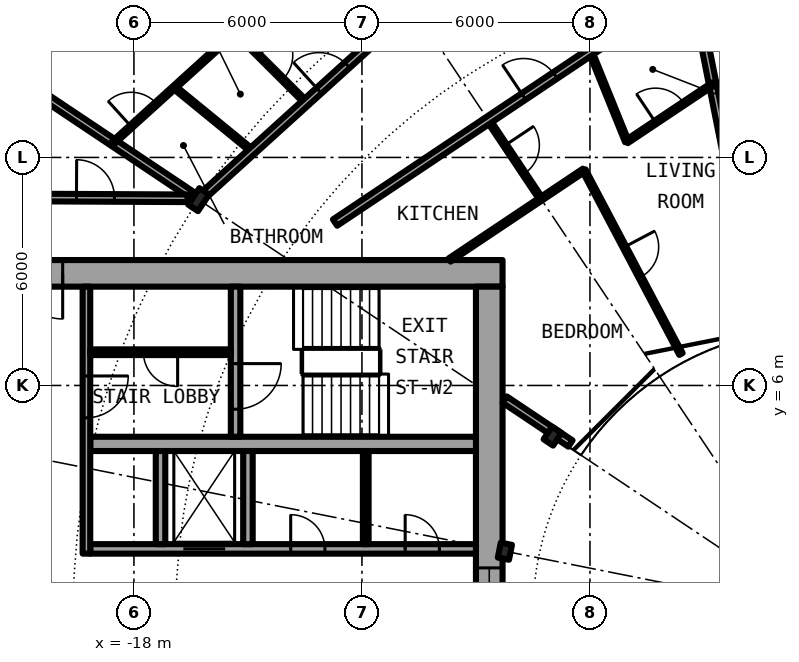
"""IFC4 building model, lengths in metres.
Left out: names, types, materials, properties, quantities, classifications, styles, units other than length and angle.
Written with IfcOpenShell. Run it as: python <this file> out.ifc"""

import sys

from ifc_helpers import new_model, si_unit, direction, frame, frame_2d, origin, origin_2d, place, context, subcontext, project, spatial, rectangle, i_section, extrude, element, fill, save


model = new_model("IFC4")
c1 = context("Model", 3, precision=1e-05, world=origin(), true_north=direction((0.0, 1.0)))
c2 = subcontext(c1, "Body", "Model", "MODEL_VIEW")
j1 = project(units=[si_unit("LENGTHUNIT", "METRE"), si_unit("PLANEANGLEUNIT", "RADIAN")], contexts=[c1])
p1 = place(None, origin())
s1 = spatial("IfcSite", under=j1, at=p1, CompositionType="ELEMENT")
p2 = place(p1, origin())
s2 = spatial("IfcBuilding", under=s1, at=p2, CompositionType="ELEMENT")
p3 = place(p2, frame((0.0, 0.0, 63.6)))
s3 = spatial("IfcBuildingStorey", under=s2, at=p3, CompositionType="ELEMENT", Elevation=63.6)
p4 = place(p3, frame((-16.297, 10.889, 0.0), z_axis=(0.0, 0.0, 1.0), x_axis=(-0.831469612303, 0.55557023302, 0.0)))
e1 = element("IfcColumn", 1, at=p4, inside=s3, PredefinedType="COLUMN", context=c2, shape_type="SweptSolid", body=[
    extrude(i_section(OverallWidth=0.306, OverallDepth=0.524, WebThickness=0.021, FlangeThickness=0.04, FilletRadius=0.027, at=origin_2d()), origin(), (0.0, 0.0, 1.0), 3.05),
])
for number, where, z_axis, x_axis in (
    (2, (-6.984, 4.667, 0.0), (0.0, 0.0, 1.0), (-0.831, 0.556, 0.0)),
    (3, (-8.239, 1.639, 0.0), (0.0, 0.0, 1.0), (-0.981, 0.195, 0.0)),
):
    element("IfcColumn", number, at=place(p3, frame(where, z_axis=z_axis, x_axis=x_axis)), inside=s3, PredefinedType="COLUMN", context=c2, shape_type="SweptSolid", body=[
        extrude(i_section(OverallWidth=0.3, OverallDepth=0.4, WebThickness=0.013, FlangeThickness=0.024, FilletRadius=0.027, at=origin_2d()), origin(), (0.0, 0.0, 1.0), 3.05),
    ])
p5 = place(p3, frame((-8.3, 8.95, 0.0), z_axis=(0.0, 0.0, 1.0), x_axis=(-1.0, 0.0, 0.0)))
e4 = element("IfcWall", 4, at=p5, inside=s3, PredefinedType="SHEAR", context=c2, shape_type="SweptSolid", body=[
    extrude(rectangle(XDim=14.0, YDim=0.7, at=frame_2d((7.0, 0.0))), origin(), (0.0, 0.0, 1.0), 3.05),
])
p6 = place(p5, frame((11.575, 0.0, 0.0)))
e5 = element("IfcOpeningElement", 5, at=p6, cuts=e4, PredefinedType="OPENING", context=c2, shape_type="SweptSolid", body=[
    extrude(rectangle(XDim=1.2, YDim=2.3, at=frame_2d((0.6, 1.15))), frame((0.0, 0.36, 0.0), z_axis=(0.0, -1.0, 0.0), x_axis=(1.0, 0.0, 0.0)), (0.0, 0.0, 1.0), 0.72),
])
p7 = place(p3, frame((-8.65, 8.6, 0.0), z_axis=(0.0, 0.0, 1.0), x_axis=(0.0, -1.0, 0.0)))
e6 = element("IfcWall", 6, at=p7, inside=s3, PredefinedType="SHEAR", context=c2, shape_type="SweptSolid", body=[
    extrude(rectangle(XDim=17.2, YDim=0.7, at=frame_2d((8.6, 0.0))), origin(), (0.0, 0.0, 1.0), 3.05),
])
p8 = place(p7, frame((7.4, 0.0, 0.1)))
e7 = element("IfcOpeningElement", 7, at=p8, cuts=e6, PredefinedType="OPENING", context=c2, shape_type="SweptSolid", body=[
    extrude(rectangle(XDim=2.4, YDim=2.2, at=frame_2d((1.2, 1.1))), frame((0.0, 0.36, 0.0), z_axis=(0.0, -1.0, 0.0), x_axis=(1.0, 0.0, 0.0)), (0.0, 0.0, 1.0), 0.72),
])
p9 = place(p3, frame((-19.15, 1.7, 0.0), z_axis=(0.0, 0.0, 1.0), x_axis=(1.0, 0.0, 0.0)))
e8 = element("IfcWall", 8, at=p9, inside=s3, PredefinedType="SHEAR", context=c2, shape_type="SweptSolid", body=[
    extrude(rectangle(XDim=10.15, YDim=0.25, at=frame_2d((5.075, 0.0))), origin(), (0.0, 0.0, 1.0), 3.05),
])
p10 = place(p9, frame((2.45, 0.0, 0.0)))
e9 = element("IfcOpeningElement", 9, at=p10, cuts=e8, PredefinedType="OPENING", context=c2, shape_type="SweptSolid", body=[
    extrude(rectangle(XDim=1.1, YDim=2.3, at=frame_2d((0.55, 1.15))), frame((0.0, 0.135, 0.0), z_axis=(0.0, -1.0, 0.0), x_axis=(1.0, 0.0, 0.0)), (0.0, 0.0, 1.0), 0.27),
])
p11 = place(p9, frame((8.288, 0.0, 0.0)))
e10 = element("IfcOpeningElement", 10, at=p11, cuts=e8, PredefinedType="OPENING", context=c2, shape_type="SweptSolid", body=[
    extrude(rectangle(XDim=0.9, YDim=2.3, at=frame_2d((0.45, 1.15))), frame((0.0, 0.135, 0.0), z_axis=(0.0, -1.0, 0.0), x_axis=(1.0, 0.0, 0.0)), (0.0, 0.0, 1.0), 0.27),
])
p12 = place(p9, frame((5.275, 0.0, 0.0)))
e11 = element("IfcOpeningElement", 11, at=p12, cuts=e8, PredefinedType="OPENING", context=c2, shape_type="SweptSolid", body=[
    extrude(rectangle(XDim=0.9, YDim=2.3, at=frame_2d((0.45, 1.15))), frame((0.0, 0.135, 0.0), z_axis=(0.0, -1.0, 0.0), x_axis=(1.0, 0.0, 0.0)), (0.0, 0.0, 1.0), 0.27),
])
p13 = place(p3, frame((-9.0, 4.462, 0.0), z_axis=(0.0, 0.0, 1.0), x_axis=(-1.0, 0.0, 0.0)))
e12 = element("IfcWall", 12, at=p13, inside=s3, PredefinedType="SHEAR", context=c2, shape_type="SweptSolid", body=[
    extrude(rectangle(XDim=10.15, YDim=0.375, at=frame_2d((5.075, 0.0))), origin(), (0.0, 0.0, 1.0), 3.05),
])
p14 = place(p3, frame((-15.325, 8.6, 0.0), z_axis=(0.0, 0.0, 1.0), x_axis=(0.0, -1.0, 0.0)))
e13 = element("IfcWall", 13, at=p14, inside=s3, PredefinedType="SHEAR", context=c2, shape_type="SweptSolid", body=[
    extrude(rectangle(XDim=3.95, YDim=0.25, at=frame_2d((1.975, 0.0))), origin(), (0.0, 0.0, 1.0), 3.05),
])
p15 = place(p14, frame((2.025, 0.0, 0.0)))
e14 = element("IfcOpeningElement", 14, at=p15, cuts=e13, PredefinedType="OPENING", context=c2, shape_type="SweptSolid", body=[
    extrude(rectangle(XDim=1.2, YDim=2.3, at=frame_2d((0.6, 1.15))), frame((0.0, 0.135, 0.0), z_axis=(0.0, -1.0, 0.0), x_axis=(1.0, 0.0, 0.0)), (0.0, 0.0, 1.0), 0.27),
])
for number, where, z_axis, x_axis in (
    (15, (-15.0, 1.825, 0.0), (0.0, 0.0, 1.0), (0.0, 1.0, 0.0)),
    (16, (-17.3, 1.825, 0.0), (0.0, 0.0, 1.0), (0.0, 1.0, 0.0)),
):
    element("IfcWall", number, at=place(p3, frame(where, z_axis=z_axis, x_axis=x_axis)), inside=s3, PredefinedType="SOLIDWALL", context=c2, shape_type="SweptSolid", body=[
        extrude(rectangle(XDim=2.45, YDim=0.25, at=frame_2d((1.225, 0.0))), origin(), (0.0, 0.0, 1.0), 2.7),
    ])
p16 = place(p3, frame((-19.25, 8.6, 0.0), z_axis=(0.0, 0.0, 1.0), x_axis=(0.0, -1.0, 0.0)))
e17 = element("IfcWall", 17, at=p16, inside=s3, PredefinedType="SOLIDWALL", context=c2, shape_type="SweptSolid", body=[
    extrude(rectangle(XDim=7.025, YDim=0.2, at=frame_2d((3.513, 0.0))), origin(), (0.0, 0.0, 1.0), 2.7),
])
p17 = place(p16, frame((2.35, 0.0, 0.0)))
e18 = element("IfcOpeningElement", 18, at=p17, cuts=e17, PredefinedType="OPENING", context=c2, shape_type="SweptSolid", body=[
    extrude(rectangle(XDim=1.1, YDim=2.3, at=frame_2d((0.55, 1.15))), frame((0.0, 0.11, 0.0), z_axis=(0.0, -1.0, 0.0), x_axis=(1.0, 0.0, 0.0)), (0.0, 0.0, 1.0), 0.22),
])
p18 = place(p3, frame((-11.9, 1.825, 0.0), z_axis=(0.0, 0.0, 1.0), x_axis=(0.0, 1.0, 0.0)))
e19 = element("IfcWall", 19, at=p18, inside=s3, PredefinedType="PARTITIONING", context=c2, shape_type="SweptSolid", body=[
    extrude(rectangle(XDim=2.45, YDim=0.15, at=frame_2d((1.225, 0.0))), origin(), (0.0, 0.0, 1.0), 2.7),
])
p19 = place(p3, frame((-15.45, 6.875, 0.0), z_axis=(0.0, 0.0, 1.0), x_axis=(-1.0, 0.0, 0.0)))
e20 = element("IfcWall", 20, at=p19, inside=s3, PredefinedType="PARTITIONING", context=c2, shape_type="SweptSolid", body=[
    extrude(rectangle(XDim=3.7, YDim=0.15, at=frame_2d((1.85, 0.0))), origin(), (0.0, 0.0, 1.0), 2.7),
])
p20 = place(p19, frame((1.4, 0.0, 0.0)))
e21 = element("IfcOpeningElement", 21, at=p20, cuts=e20, PredefinedType="OPENING", context=c2, shape_type="SweptSolid", body=[
    extrude(rectangle(XDim=0.9, YDim=2.3, at=frame_2d((0.45, 1.15))), frame((0.0, 0.085, 0.0), z_axis=(0.0, -1.0, 0.0), x_axis=(1.0, 0.0, 0.0)), (0.0, 0.0, 1.0), 0.17),
])
p21 = place(p3, frame((-22.595, 15.098, 0.0), z_axis=(0.0, 0.0, 1.0), x_axis=(0.831382022135, -0.555701298605, 0.0)))
e22 = element("IfcWall", 22, at=p21, inside=s3, PredefinedType="PARTITIONING", context=c2, shape_type="SweptSolid", body=[
    extrude(rectangle(XDim=7.313, YDim=0.2, at=frame_2d((3.657, 0.0))), origin(), (0.0, 0.0, 1.0), 2.7),
])
p22 = place(p3, frame((-17.219, 21.023, 0.0), z_axis=(0.0, 0.0, 1.0), x_axis=(0.633664062855, -0.773608334654, 0.0)))
e23 = element("IfcWall", 23, at=p22, inside=s3, PredefinedType="PARTITIONING", context=c2, shape_type="SweptSolid", body=[
    extrude(rectangle(XDim=8.138, YDim=0.1, at=frame_2d((4.069, 0.0))), origin(), (0.0, 0.0, 1.0), 2.7),
])
p23 = place(p22, frame((6.377, 0.0, 0.0)))
e24 = element("IfcOpeningElement", 24, at=p23, cuts=e23, PredefinedType="OPENING", context=c2, shape_type="SweptSolid", body=[
    extrude(rectangle(XDim=0.9, YDim=2.3, at=frame_2d((0.45, 1.15))), frame((0.0, 0.06, 0.0), z_axis=(0.0, -1.0, 0.0), x_axis=(1.0, 0.0, 0.0)), (0.0, 0.0, 1.0), 0.12),
])
p24 = place(p22, frame((2.308, 0.0, 0.0)))
e25 = element("IfcOpeningElement", 25, at=p24, cuts=e23, PredefinedType="OPENING", context=c2, shape_type="SweptSolid", body=[
    extrude(rectangle(XDim=0.9, YDim=2.3, at=frame_2d((0.45, 1.15))), frame((0.0, 0.06, 0.0), z_axis=(0.0, -1.0, 0.0), x_axis=(1.0, 0.0, 0.0)), (0.0, 0.0, 1.0), 0.12),
])
p25 = place(p3, frame((-16.936, 13.845, 0.0), z_axis=(0.0, 0.0, 1.0), x_axis=(0.774162545943, -0.632986850147, 0.0)))
e26 = element("IfcWall", 26, at=p25, inside=s3, PredefinedType="PARTITIONING", context=c2, shape_type="SweptSolid", body=[
    extrude(rectangle(XDim=2.649, YDim=0.1, at=frame_2d((1.325, 0.0))), origin(), (0.0, 0.0, 1.0), 2.7),
])
p26 = place(p3, frame((-15.33, 15.3, 0.0), z_axis=(0.0, 0.0, 1.0), x_axis=(0.707851299421, -0.706361478217, 0.0)))
e27 = element("IfcWall", 27, at=p26, inside=s3, PredefinedType="PARTITIONING", context=c2, shape_type="SweptSolid", body=[
    extrude(rectangle(XDim=2.622, YDim=0.1, at=frame_2d((1.311, 0.0))), origin(), (0.0, 0.0, 1.0), 2.7),
])
p27 = place(p26, frame((0.861, 0.0, 0.0)))
e28 = element("IfcOpeningElement", 28, at=p27, cuts=e27, PredefinedType="OPENING", context=c2, shape_type="SweptSolid", body=[
    extrude(rectangle(XDim=0.9, YDim=2.3, at=frame_2d((0.45, 1.15))), frame((0.0, 0.06, 0.0), z_axis=(0.0, -1.0, 0.0), x_axis=(1.0, 0.0, 0.0)), (0.0, 0.0, 1.0), 0.12),
])
p28 = place(p3, frame((-8.674, 12.982, 0.0), z_axis=(0.0, 0.0, 1.0), x_axis=(0.555355163998, -0.831613276602, 0.0)))
e29 = element("IfcWall", 29, at=p28, inside=s3, PredefinedType="PARTITIONING", context=c2, shape_type="SweptSolid", body=[
    extrude(rectangle(XDim=2.494, YDim=0.1, at=frame_2d((1.247, 0.0))), origin(), (0.0, 0.0, 1.0), 2.7),
])
p29 = place(p28, frame((0.797, 0.0, 0.0)))
e30 = element("IfcOpeningElement", 30, at=p29, cuts=e29, PredefinedType="OPENING", context=c2, shape_type="SweptSolid", body=[
    extrude(rectangle(XDim=0.9, YDim=2.3, at=frame_2d((0.45, 1.15))), frame((0.0, 0.06, 0.0), z_axis=(0.0, -1.0, 0.0), x_axis=(1.0, 0.0, 0.0)), (0.0, 0.0, 1.0), 0.12),
])
p30 = place(p3, frame((-6.159, 11.663, 0.0), z_axis=(0.0, 0.0, 1.0), x_axis=(0.466976820365, -0.884269556889, 0.0)))
e31 = element("IfcWall", 31, at=p30, inside=s3, PredefinedType="PARTITIONING", context=c2, shape_type="SweptSolid", body=[
    extrude(rectangle(XDim=5.469, YDim=0.1, at=frame_2d((2.735, 0.0))), origin(), (0.0, 0.0, 1.0), 2.7),
])
p31 = place(p30, frame((2.284, 0.0, 0.0)))
e32 = element("IfcOpeningElement", 32, at=p31, cuts=e31, PredefinedType="OPENING", context=c2, shape_type="SweptSolid", body=[
    extrude(rectangle(XDim=0.9, YDim=2.3, at=frame_2d((0.45, 1.15))), frame((0.0, 0.06, 0.0), z_axis=(0.0, -1.0, 0.0), x_axis=(1.0, 0.0, 0.0)), (0.0, 0.0, 1.0), 0.12),
])
p32 = place(p3, frame((-5.986, 14.779, 0.0), z_axis=(0.0, 0.0, 1.0), x_axis=(0.375649498413, -0.926761811008, 0.0)))
e33 = element("IfcWall", 33, at=p32, inside=s3, PredefinedType="PARTITIONING", context=c2, shape_type="SweptSolid", body=[
    extrude(rectangle(XDim=2.548, YDim=0.1, at=frame_2d((1.274, 0.0))), origin(), (0.0, 0.0, 1.0), 2.7),
])
p33 = place(p3, frame((-3.297, 16.575, 0.0), z_axis=(0.0, 0.0, 1.0), x_axis=(0.195092097924, -0.980784927152, 0.0)))
e34 = element("IfcWall", 34, at=p33, inside=s3, PredefinedType="PARTITIONING", context=c2, shape_type="SweptSolid", body=[
    extrude(rectangle(XDim=8.299, YDim=0.2, at=frame_2d((4.15, 0.0))), origin(), (0.0, 0.0, 1.0), 2.7),
])
p34 = place(p3, frame((-6.513, 4.472, 0.0), z_axis=(0.0, 0.0, 1.0), x_axis=(-0.831382204863, 0.555701025225, 0.0)))
e35 = element("IfcWall", 35, at=p34, inside=s3, PredefinedType="PARTITIONING", context=c2, shape_type="SweptSolid", body=[
    extrude(rectangle(XDim=2.082, YDim=0.2, at=frame_2d((1.041, 0.0))), origin(), (0.0, 0.0, 1.0), 2.7),
])
p35 = place(p3, frame((-21.675, 10.95, 0.0), z_axis=(0.0, 0.0, 1.0), x_axis=(0.999988019025, -0.004895079807, 0.0)))
e36 = element("IfcWall", 36, at=p35, inside=s3, PredefinedType="PARTITIONING", context=c2, shape_type="SweptSolid", body=[
    extrude(rectangle(XDim=5.087, YDim=0.2, at=frame_2d((2.543, 0.0))), origin(), (0.0, 0.0, 1.0), 2.7),
])
p36 = place(p35, frame((2.163, 0.0, 0.0)))
e37 = element("IfcOpeningElement", 37, at=p36, cuts=e36, PredefinedType="OPENING", context=c2, shape_type="SweptSolid", body=[
    extrude(rectangle(XDim=1.0, YDim=2.3, at=frame_2d((0.5, 1.15))), frame((0.0, 0.11, 0.0), z_axis=(0.0, -1.0, 0.0), x_axis=(1.0, 0.0, 0.0)), (0.0, 0.0, 1.0), 0.22),
])
p37 = place(p3, frame((-9.695, 9.3, 0.0), z_axis=(0.0, 0.0, 1.0), x_axis=(0.831369521678, 0.555720000022, 0.0)))
e38 = element("IfcWall", 38, at=p37, inside=s3, PredefinedType="PARTITIONING", context=c2, shape_type="SweptSolid", body=[
    extrude(rectangle(XDim=4.252, YDim=0.1, at=frame_2d((2.126, 0.0))), origin(), (0.0, 0.0, 1.0), 2.7),
])
p38 = place(p3, frame((-5.032, 12.417, 0.0), z_axis=(0.0, 0.0, 1.0), x_axis=(0.831538390496, 0.555467285384, 0.0)))
e39 = element("IfcWall", 39, at=p38, inside=s3, PredefinedType="PARTITIONING", context=c2, shape_type="SweptSolid", body=[
    extrude(rectangle(XDim=2.717, YDim=0.1, at=frame_2d((1.358, 0.0))), origin(), (0.0, 0.0, 1.0), 2.7),
])
p39 = place(p38, frame((0.911, 0.0, 0.0)))
e40 = element("IfcOpeningElement", 40, at=p39, cuts=e39, PredefinedType="OPENING", context=c2, shape_type="SweptSolid", body=[
    extrude(rectangle(XDim=0.9, YDim=2.3, at=frame_2d((0.45, 1.15))), frame((0.0, 0.06, 0.0), z_axis=(0.0, -1.0, 0.0), x_axis=(1.0, 0.0, 0.0)), (0.0, 0.0, 1.0), 0.12),
])
p40 = place(p3, frame((-2.77, 13.926, 0.0), z_axis=(0.0, 0.0, 1.0), x_axis=(0.99880320044, -0.048909782152, 0.0)))
e41 = element("IfcWall", 41, at=p40, inside=s3, PredefinedType="PARTITIONING", context=c2, shape_type="SweptSolid", body=[
    extrude(rectangle(XDim=2.76, YDim=0.1, at=frame_2d((1.38, 0.0))), origin(), (0.0, 0.0, 1.0), 2.7),
])
p41 = place(p40, frame((0.93, 0.0, 0.0)))
e42 = element("IfcOpeningElement", 42, at=p41, cuts=e41, PredefinedType="OPENING", context=c2, shape_type="SweptSolid", body=[
    extrude(rectangle(XDim=0.9, YDim=2.3, at=frame_2d((0.45, 1.15))), frame((0.0, 0.06, 0.0), z_axis=(0.0, -1.0, 0.0), x_axis=(1.0, 0.0, 0.0)), (0.0, 0.0, 1.0), 0.12),
])
p42 = place(p3, frame((-12.708, 10.286, 0.0), z_axis=(0.0, 0.0, 1.0), x_axis=(0.831405725802, 0.555665834026, 0.0)))
e43 = element("IfcWall", 43, at=p42, inside=s3, PredefinedType="PARTITIONING", context=c2, shape_type="SweptSolid", body=[
    extrude(rectangle(XDim=11.314, YDim=0.2, at=frame_2d((5.657, 0.0))), origin(), (0.0, 0.0, 1.0), 2.7),
])
p43 = place(p42, frame((5.969, 0.0, 0.0)))
e44 = element("IfcOpeningElement", 44, at=p43, cuts=e43, PredefinedType="OPENING", context=c2, shape_type="SweptSolid", body=[
    extrude(rectangle(XDim=1.0, YDim=2.3, at=frame_2d((0.5, 1.15))), frame((0.0, 0.11, 0.0), z_axis=(0.0, -1.0, 0.0), x_axis=(1.0, 0.0, 0.0)), (0.0, 0.0, 1.0), 0.22),
])
p44 = place(p3, frame((-16.18, 10.995, 0.0), z_axis=(0.0, 0.0, 1.0), x_axis=(0.741086986457, 0.671409024741, 0.0)))
e45 = element("IfcWall", 45, at=p44, inside=s3, PredefinedType="PARTITIONING", context=c2, shape_type="SweptSolid", body=[
    extrude(rectangle(XDim=9.373, YDim=0.2, at=frame_2d((4.687, 0.0))), origin(), (0.0, 0.0, 1.0), 2.38),
])
p45 = place(p44, frame((4.115, 0.0, 0.0)))
e46 = element("IfcOpeningElement", 46, at=p45, cuts=e45, PredefinedType="OPENING", context=c2, shape_type="SweptSolid", body=[
    extrude(rectangle(XDim=1.0, YDim=2.3, at=frame_2d((0.5, 1.15))), frame((0.0, 0.11, 0.0), z_axis=(0.0, -1.0, 0.0), x_axis=(1.0, 0.0, 0.0)), (0.0, 0.0, 1.0), 0.22),
])
p46 = place(p3, frame((-18.54, 12.392, 0.0), z_axis=(0.0, 0.0, 1.0), x_axis=(0.741109646243, 0.671384012504, 0.0)))
e47 = element("IfcWall", 47, at=p46, inside=s3, PredefinedType="PARTITIONING", context=c2, shape_type="SweptSolid", body=[
    extrude(rectangle(XDim=4.331, YDim=0.1, at=frame_2d((2.166, 0.0))), origin(), (0.0, 0.0, 1.0), 2.7),
])
p47 = place(p46, frame((0.629, 0.0, 0.0)))
e48 = element("IfcOpeningElement", 48, at=p47, cuts=e47, PredefinedType="OPENING", context=c2, shape_type="SweptSolid", body=[
    extrude(rectangle(XDim=0.9, YDim=2.3, at=frame_2d((0.45, 1.15))), frame((0.0, 0.06, 0.0), z_axis=(0.0, -1.0, 0.0), x_axis=(1.0, 0.0, 0.0)), (0.0, 0.0, 1.0), 0.12),
])
p48 = place(p10, origin())
e49 = element("IfcDoor", 49, at=p48, inside=s3, OperationType="DOUBLE_DOOR_SLIDING", PredefinedType="DOOR", context=c2, shape_type="SweptSolid", body=[
    extrude(rectangle(XDim=1.1, YDim=2.3, at=frame_2d((0.55, 1.15))), frame((0.0, 0.025, 0.0), z_axis=(0.0, -1.0, 0.0), x_axis=(1.0, 0.0, 0.0)), (0.0, 0.0, 1.0), 0.05),
])
fill(e9, e49)
p49 = place(p11, origin())
e50 = element("IfcDoor", 50, at=p49, inside=s3, OperationType="SINGLE_SWING_LEFT", PredefinedType="DOOR", context=c2, shape_type="SweptSolid", body=[
    extrude(rectangle(XDim=0.9, YDim=2.3, at=frame_2d((0.45, 1.15))), frame((0.0, 0.025, 0.0), z_axis=(0.0, -1.0, 0.0), x_axis=(1.0, 0.0, 0.0)), (0.0, 0.0, 1.0), 0.05),
])
fill(e10, e50)
p50 = place(p12, origin())
e51 = element("IfcDoor", 51, at=p50, inside=s3, OperationType="SINGLE_SWING_LEFT", PredefinedType="DOOR", context=c2, shape_type="SweptSolid", body=[
    extrude(rectangle(XDim=0.9, YDim=2.3, at=frame_2d((0.45, 1.15))), frame((0.0, 0.025, 0.0), z_axis=(0.0, -1.0, 0.0), x_axis=(1.0, 0.0, 0.0)), (0.0, 0.0, 1.0), 0.05),
])
fill(e11, e51)
p51 = place(p20, origin())
e52 = element("IfcDoor", 52, at=p51, inside=s3, OperationType="SINGLE_SWING_LEFT", PredefinedType="DOOR", context=c2, shape_type="SweptSolid", body=[
    extrude(rectangle(XDim=0.9, YDim=2.3, at=frame_2d((0.45, 1.15))), frame((0.0, 0.025, 0.0), z_axis=(0.0, -1.0, 0.0), x_axis=(1.0, 0.0, 0.0)), (0.0, 0.0, 1.0), 0.05),
])
fill(e21, e52)
p52 = place(p15, origin())
e53 = element("IfcDoor", 53, at=p52, inside=s3, OperationType="SINGLE_SWING_LEFT", PredefinedType="DOOR", context=c2, shape_type="SweptSolid", body=[
    extrude(rectangle(XDim=1.2, YDim=2.3, at=frame_2d((0.6, 1.15))), frame((0.0, 0.025, 0.0), z_axis=(0.0, -1.0, 0.0), x_axis=(1.0, 0.0, 0.0)), (0.0, 0.0, 1.0), 0.05),
])
fill(e14, e53)
p53 = place(p17, origin())
e54 = element("IfcDoor", 54, at=p53, inside=s3, OperationType="SINGLE_SWING_RIGHT", PredefinedType="DOOR", context=c2, shape_type="SweptSolid", body=[
    extrude(rectangle(XDim=1.1, YDim=2.3, at=frame_2d((0.55, 1.15))), frame((0.0, 0.025, 0.0), z_axis=(0.0, -1.0, 0.0), x_axis=(1.0, 0.0, 0.0)), (0.0, 0.0, 1.0), 0.05),
])
fill(e18, e54)
p54 = place(p6, origin())
e55 = element("IfcDoor", 55, at=p54, inside=s3, OperationType="SINGLE_SWING_LEFT", PredefinedType="DOOR", context=c2, shape_type="SweptSolid", body=[
    extrude(rectangle(XDim=1.2, YDim=2.3, at=frame_2d((0.6, 1.15))), frame((0.0, 0.025, 0.0), z_axis=(0.0, -1.0, 0.0), x_axis=(1.0, 0.0, 0.0)), (0.0, 0.0, 1.0), 0.05),
])
fill(e5, e55)
p55 = place(p8, origin())
e56 = element("IfcWindow", 56, at=p55, inside=s3, PartitioningType="SINGLE_PANEL", PredefinedType="WINDOW", context=c2, shape_type="SweptSolid", body=[
    extrude(rectangle(XDim=2.4, YDim=2.2, at=frame_2d((1.2, 1.1))), frame((0.0, 0.03, 0.0), z_axis=(0.0, -1.0, 0.0), x_axis=(1.0, 0.0, 0.0)), (0.0, 0.0, 1.0), 0.06),
])
fill(e7, e56)
p56 = place(p45, origin())
e57 = element("IfcDoor", 57, at=p56, inside=s3, OperationType="SINGLE_SWING_LEFT", PredefinedType="DOOR", context=c2, shape_type="SweptSolid", body=[
    extrude(rectangle(XDim=1.0, YDim=2.3, at=frame_2d((0.5, 1.15))), frame((0.0, 0.025, 0.0), z_axis=(0.0, -1.0, 0.0), x_axis=(1.0, 0.0, 0.0)), (0.0, 0.0, 1.0), 0.05),
])
fill(e46, e57)
p57 = place(p47, origin())
e58 = element("IfcDoor", 58, at=p57, inside=s3, OperationType="SINGLE_SWING_LEFT", PredefinedType="DOOR", context=c2, shape_type="SweptSolid", body=[
    extrude(rectangle(XDim=0.9, YDim=2.3, at=frame_2d((0.45, 1.15))), frame((0.0, 0.025, 0.0), z_axis=(0.0, -1.0, 0.0), x_axis=(1.0, 0.0, 0.0)), (0.0, 0.0, 1.0), 0.05),
])
fill(e48, e58)
p58 = place(p27, origin())
e59 = element("IfcDoor", 59, at=p58, inside=s3, OperationType="SINGLE_SWING_RIGHT", PredefinedType="DOOR", context=c2, shape_type="SweptSolid", body=[
    extrude(rectangle(XDim=0.9, YDim=2.3, at=frame_2d((0.45, 1.15))), frame((0.0, 0.025, 0.0), z_axis=(0.0, -1.0, 0.0), x_axis=(1.0, 0.0, 0.0)), (0.0, 0.0, 1.0), 0.05),
])
fill(e28, e59)
p59 = place(p43, origin())
e60 = element("IfcDoor", 60, at=p59, inside=s3, OperationType="SINGLE_SWING_RIGHT", PredefinedType="DOOR", context=c2, shape_type="SweptSolid", body=[
    extrude(rectangle(XDim=1.0, YDim=2.3, at=frame_2d((0.5, 1.15))), frame((0.0, 0.025, 0.0), z_axis=(0.0, -1.0, 0.0), x_axis=(1.0, 0.0, 0.0)), (0.0, 0.0, 1.0), 0.05),
])
fill(e44, e60)
p60 = place(p39, origin())
e61 = element("IfcDoor", 61, at=p60, inside=s3, OperationType="SINGLE_SWING_RIGHT", PredefinedType="DOOR", context=c2, shape_type="SweptSolid", body=[
    extrude(rectangle(XDim=0.9, YDim=2.3, at=frame_2d((0.45, 1.15))), frame((0.0, 0.025, 0.0), z_axis=(0.0, -1.0, 0.0), x_axis=(1.0, 0.0, 0.0)), (0.0, 0.0, 1.0), 0.05),
])
fill(e40, e61)
p61 = place(p29, origin())
e62 = element("IfcDoor", 62, at=p61, inside=s3, OperationType="SINGLE_SWING_RIGHT", PredefinedType="DOOR", context=c2, shape_type="SweptSolid", body=[
    extrude(rectangle(XDim=0.9, YDim=2.3, at=frame_2d((0.45, 1.15))), frame((0.0, 0.025, 0.0), z_axis=(0.0, -1.0, 0.0), x_axis=(1.0, 0.0, 0.0)), (0.0, 0.0, 1.0), 0.05),
])
fill(e30, e62)
p62 = place(p31, origin())
e63 = element("IfcDoor", 63, at=p62, inside=s3, OperationType="SINGLE_SWING_RIGHT", PredefinedType="DOOR", context=c2, shape_type="SweptSolid", body=[
    extrude(rectangle(XDim=0.9, YDim=2.3, at=frame_2d((0.45, 1.15))), frame((0.0, 0.025, 0.0), z_axis=(0.0, -1.0, 0.0), x_axis=(1.0, 0.0, 0.0)), (0.0, 0.0, 1.0), 0.05),
])
fill(e32, e63)
p63 = place(p36, origin())
e64 = element("IfcDoor", 64, at=p63, inside=s3, OperationType="SINGLE_SWING_RIGHT", PredefinedType="DOOR", context=c2, shape_type="SweptSolid", body=[
    extrude(rectangle(XDim=1.0, YDim=2.3, at=frame_2d((0.5, 1.15))), frame((0.0, 0.025, 0.0), z_axis=(0.0, -1.0, 0.0), x_axis=(1.0, 0.0, 0.0)), (0.0, 0.0, 1.0), 0.05),
])
fill(e37, e64)
save(model, sys.argv[1])
